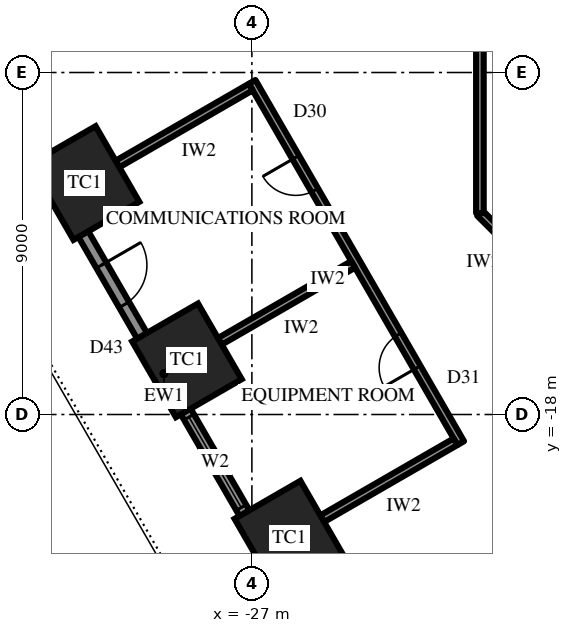
"""IFC4 building model, lengths in metres.
Left out: names, types, materials, properties, quantities, classifications, styles, units other than length and angle.
Written with IfcOpenShell. Run it as: python <this file> out.ifc"""

import sys

from ifc_helpers import new_model, si_unit, direction, frame, frame_2d, origin, origin_2d, place, context, subcontext, project, spatial, rectangle, extrude, element, fill, save


model = new_model("IFC4")
c1 = context("Model", 3, precision=1e-05, world=origin(), true_north=direction((0.0, 1.0)))
c2 = subcontext(c1, "Body", "Model", "MODEL_VIEW")
j1 = project(units=[si_unit("LENGTHUNIT", "METRE"), si_unit("PLANEANGLEUNIT", "RADIAN")], contexts=[c1])
p1 = place(None, origin())
s1 = spatial("IfcSite", under=j1, at=p1, CompositionType="ELEMENT")
p2 = place(p1, origin())
s2 = spatial("IfcBuilding", under=s1, at=p2, CompositionType="ELEMENT")
p3 = place(p2, frame((0.0, 0.0, 36.1)))
s3 = spatial("IfcBuildingStorey", under=s2, at=p3, CompositionType="ELEMENT", Elevation=36.1)
for number, where, z_axis, x_axis in (
    (1, (-31.403, -11.908, 0.0), (0.0, 0.0, 1.0), (0.5, -0.866, 0.0)),
    (2, (-28.709, -16.575, 0.0), (0.0, 0.0, 1.0), (0.5, -0.866, 0.0)),
    (3, (-26.014, -21.242, 0.0), (0.0, 0.0, 1.0), (0.5, -0.866, 0.0)),
):
    element("IfcColumn", number, at=place(p3, frame(where, z_axis=z_axis, x_axis=x_axis)), inside=s3, PredefinedType="COLUMN", context=c2, shape_type="SweptSolid", body=[
        extrude(rectangle(XDim=2.3, YDim=2.0, at=origin_2d()), origin(), (0.0, 0.0, 1.0), 4.2),
    ])
p4 = place(p3, frame((-37.398, -2.925, 0.0), z_axis=(0.0, 0.0, 1.0), x_axis=(0.499999163675, -0.866025886636, 0.0)))
e4 = element("IfcWall", 4, at=p4, inside=s3, PredefinedType="SOLIDWALL", context=c2, shape_type="SweptSolid", body=[
    extrude(rectangle(XDim=32.332, YDim=0.3, at=frame_2d((16.166, 0.0))), origin(), (0.0, 0.0, 1.0), 2.7),
])
p5 = place(p4, frame((1.319, 0.0, 0.6)))
e5 = element("IfcOpeningElement", 5, at=p5, cuts=e4, PredefinedType="OPENING", context=c2, shape_type="SweptSolid", body=[
    extrude(rectangle(XDim=2.75, YDim=1.85, at=frame_2d((1.375, 0.925))), frame((0.0, 0.16, 0.0), z_axis=(0.0, -1.0, 0.0), x_axis=(1.0, 0.0, 0.0)), (0.0, 0.0, 1.0), 0.32),
])
p6 = place(p4, frame((6.708, 0.0, 0.6)))
e6 = element("IfcOpeningElement", 6, at=p6, cuts=e4, PredefinedType="OPENING", context=c2, shape_type="SweptSolid", body=[
    extrude(rectangle(XDim=2.75, YDim=1.85, at=frame_2d((1.375, 0.925))), frame((0.0, 0.16, 0.0), z_axis=(0.0, -1.0, 0.0), x_axis=(1.0, 0.0, 0.0)), (0.0, 0.0, 1.0), 0.32),
])
p7 = place(p4, frame((12.872, 0.0, 0.0)))
e7 = element("IfcOpeningElement", 7, at=p7, cuts=e4, PredefinedType="OPENING", context=c2, shape_type="SweptSolid", body=[
    extrude(rectangle(XDim=1.2, YDim=2.4, at=frame_2d((0.6, 1.2))), frame((0.0, 0.16, 0.0), z_axis=(0.0, -1.0, 0.0), x_axis=(1.0, 0.0, 0.0)), (0.0, 0.0, 1.0), 0.32),
])
p8 = place(p4, frame((17.485, 0.0, 0.6)))
e8 = element("IfcOpeningElement", 8, at=p8, cuts=e4, PredefinedType="OPENING", context=c2, shape_type="SweptSolid", body=[
    extrude(rectangle(XDim=2.75, YDim=1.85, at=frame_2d((1.375, 0.925))), frame((0.0, 0.16, 0.0), z_axis=(0.0, -1.0, 0.0), x_axis=(1.0, 0.0, 0.0)), (0.0, 0.0, 1.0), 0.32),
])
p9 = place(p4, frame((22.874, 0.0, 0.6)))
e9 = element("IfcOpeningElement", 9, at=p9, cuts=e4, PredefinedType="OPENING", context=c2, shape_type="SweptSolid", body=[
    extrude(rectangle(XDim=2.75, YDim=1.85, at=frame_2d((1.375, 0.925))), frame((0.0, 0.16, 0.0), z_axis=(0.0, -1.0, 0.0), x_axis=(1.0, 0.0, 0.0)), (0.0, 0.0, 1.0), 0.32),
])
p10 = place(p4, frame((28.262, 0.0, 0.6)))
e10 = element("IfcOpeningElement", 10, at=p10, cuts=e4, PredefinedType="OPENING", context=c2, shape_type="SweptSolid", body=[
    extrude(rectangle(XDim=2.75, YDim=1.85, at=frame_2d((1.375, 0.925))), frame((0.0, 0.16, 0.0), z_axis=(0.0, -1.0, 0.0), x_axis=(1.0, 0.0, 0.0)), (0.0, 0.0, 1.0), 0.32),
])
p11 = place(p3, frame((-26.993, -9.247, 0.0), z_axis=(0.0, 0.0, 1.0), x_axis=(0.500002255551, -0.866024101537, 0.0)))
e11 = element("IfcWall", 11, at=p11, inside=s3, PredefinedType="PARTITIONING", context=c2, shape_type="SweptSolid", body=[
    extrude(rectangle(XDim=10.977, YDim=0.2, at=frame_2d((5.489, 0.0))), origin(), (0.0, 0.0, 1.0), 4.0),
])
p12 = place(p11, frame((2.294, 0.0, 0.0)))
e12 = element("IfcOpeningElement", 12, at=p12, cuts=e11, PredefinedType="OPENING", context=c2, shape_type="SweptSolid", body=[
    extrude(rectangle(XDim=1.0, YDim=2.2, at=frame_2d((0.5, 1.1))), frame((0.0, 0.11, 0.0), z_axis=(0.0, -1.0, 0.0), x_axis=(1.0, 0.0, 0.0)), (0.0, 0.0, 1.0), 0.22),
])
p13 = place(p11, frame((7.683, 0.0, 0.0)))
e13 = element("IfcOpeningElement", 13, at=p13, cuts=e11, PredefinedType="OPENING", context=c2, shape_type="SweptSolid", body=[
    extrude(rectangle(XDim=1.0, YDim=2.2, at=frame_2d((0.5, 1.1))), frame((0.0, 0.11, 0.0), z_axis=(0.0, -1.0, 0.0), x_axis=(1.0, 0.0, 0.0)), (0.0, 0.0, 1.0), 0.22),
])
p14 = place(p3, frame((-27.03, -9.383, 0.0), z_axis=(0.0, 0.0, 1.0), x_axis=(-0.866019956843, -0.50000943426, 0.0)))
e14 = element("IfcWall", 14, at=p14, inside=s3, PredefinedType="PARTITIONING", context=c2, shape_type="SweptSolid", body=[
    extrude(rectangle(XDim=4.05, YDim=0.2, at=frame_2d((2.025, 0.0))), origin(), (0.0, 0.0, 1.0), 2.944),
])
p15 = place(p3, frame((-24.335, -14.05, 0.0), z_axis=(0.0, 0.0, 1.0), x_axis=(-0.866046058097, -0.499964223975, 0.0)))
e15 = element("IfcWall", 15, at=p15, inside=s3, PredefinedType="PARTITIONING", context=c2, shape_type="SweptSolid", body=[
    extrude(rectangle(XDim=4.05, YDim=0.2, at=frame_2d((2.025, 0.0))), origin(), (0.0, 0.0, 1.0), 4.0),
])
p16 = place(p3, frame((-21.641, -18.717, 0.0), z_axis=(0.0, 0.0, 1.0), x_axis=(-0.866004885491, -0.500035537042, 0.0)))
e16 = element("IfcWall", 16, at=p16, inside=s3, PredefinedType="PARTITIONING", context=c2, shape_type="SweptSolid", body=[
    extrude(rectangle(XDim=4.05, YDim=0.2, at=frame_2d((2.025, 0.0))), origin(), (0.0, 0.0, 1.0), 2.992),
])
p17 = place(p3, frame((-19.6, -14.1, 0.0), z_axis=(0.0, 0.0, 1.0), x_axis=(-0.707045124756, 0.707168432242, 0.0)))
e17 = element("IfcWall", 17, at=p17, inside=s3, PredefinedType="PARTITIONING", context=c2, shape_type="SweptSolid", body=[
    extrude(rectangle(XDim=1.98, YDim=0.2, at=frame_2d((0.99, 0.0))), origin(), (0.0, 0.0, 1.0), 4.0),
])
p18 = place(p3, frame((-21.0, -12.7, 0.0), z_axis=(0.0, 0.0, 1.0), x_axis=(0.0, 1.0, 0.0)))
e18 = element("IfcWall", 18, at=p18, inside=s3, PredefinedType="PARTITIONING", context=c2, shape_type="SweptSolid", body=[
    extrude(rectangle(XDim=25.4, YDim=0.2, at=frame_2d((12.7, 0.0))), origin(), (0.0, 0.0, 1.0), 4.0),
])
p19 = place(p18, frame((11.8, 0.0, 0.0)))
e19 = element("IfcOpeningElement", 19, at=p19, cuts=e18, PredefinedType="OPENING", context=c2, shape_type="SweptSolid", body=[
    extrude(rectangle(XDim=1.8, YDim=2.4, at=frame_2d((0.9, 1.2))), frame((0.0, 0.11, 0.0), z_axis=(0.0, -1.0, 0.0), x_axis=(1.0, 0.0, 0.0)), (0.0, 0.0, 1.0), 0.22),
])
p20 = place(p7, origin())
e20 = element("IfcDoor", 20, at=p20, inside=s3, OperationType="SINGLE_SWING_RIGHT", PredefinedType="DOOR", context=c2, shape_type="SweptSolid", body=[
    extrude(rectangle(XDim=1.2, YDim=2.4, at=frame_2d((0.6, 1.2))), frame((0.0, 0.025, 0.0), z_axis=(0.0, -1.0, 0.0), x_axis=(1.0, 0.0, 0.0)), (0.0, 0.0, 1.0), 0.05),
])
fill(e7, e20)
p21 = place(p8, origin())
e21 = element("IfcWindow", 21, at=p21, inside=s3, PartitioningType="SINGLE_PANEL", PredefinedType="WINDOW", context=c2, shape_type="SweptSolid", body=[
    extrude(rectangle(XDim=2.75, YDim=1.85, at=frame_2d((1.375, 0.925))), frame((0.0, 0.03, 0.0), z_axis=(0.0, -1.0, 0.0), x_axis=(1.0, 0.0, 0.0)), (0.0, 0.0, 1.0), 0.06),
])
fill(e8, e21)
p22 = place(p12, frame((1.0, 0.0, 0.0), z_axis=(0.0, 0.0, 1.0), x_axis=(-1.0, 0.0, 0.0)))
e22 = element("IfcDoor", 22, at=p22, inside=s3, OperationType="SINGLE_SWING_LEFT", PredefinedType="DOOR", context=c2, shape_type="SweptSolid", body=[
    extrude(rectangle(XDim=1.0, YDim=2.2, at=frame_2d((0.5, 1.1))), frame((0.0, 0.025, 0.0), z_axis=(0.0, -1.0, 0.0), x_axis=(1.0, 0.0, 0.0)), (0.0, 0.0, 1.0), 0.05),
])
fill(e12, e22)
p23 = place(p13, frame((1.0, 0.0, 0.0), z_axis=(0.0, 0.0, 1.0), x_axis=(-1.0, 0.0, 0.0)))
e23 = element("IfcDoor", 23, at=p23, inside=s3, OperationType="SINGLE_SWING_RIGHT", PredefinedType="DOOR", context=c2, shape_type="SweptSolid", body=[
    extrude(rectangle(XDim=1.0, YDim=2.2, at=frame_2d((0.5, 1.1))), frame((0.0, 0.025, 0.0), z_axis=(0.0, -1.0, 0.0), x_axis=(1.0, 0.0, 0.0)), (0.0, 0.0, 1.0), 0.05),
])
fill(e13, e23)
save(model, sys.argv[1])
